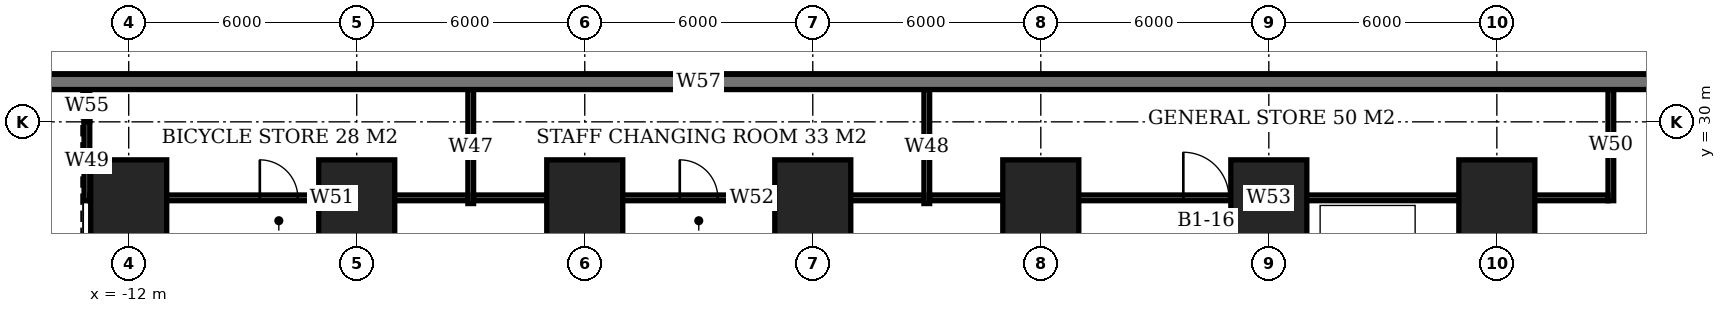
"""IFC4 building model, lengths in metres.
Left out: names, types, materials, properties, quantities, classifications, styles, units other than length and angle.
Written with IfcOpenShell. Run it as: python <this file> out.ifc"""

import sys

from ifc_helpers import new_model, si_unit, direction, frame, frame_2d, origin, origin_2d, place, context, subcontext, project, spatial, rectangle, extrude, element, fill, save


model = new_model("IFC4")
c1 = context("Model", 3, precision=1e-05, world=origin(), true_north=direction((0.0, 1.0)))
c2 = subcontext(c1, "Body", "Model", "MODEL_VIEW")
j1 = project(units=[si_unit("LENGTHUNIT", "METRE"), si_unit("PLANEANGLEUNIT", "RADIAN")], contexts=[c1])
p1 = place(None, origin())
s1 = spatial("IfcSite", under=j1, at=p1, CompositionType="ELEMENT")
p2 = place(p1, origin())
s2 = spatial("IfcBuilding", under=s1, at=p2, CompositionType="ELEMENT")
p3 = place(p2, frame((0.0, 0.0, -4.5)))
s3 = spatial("IfcBuildingStorey", under=s2, at=p3, CompositionType="ELEMENT", Elevation=-4.5)
for number, where, z_axis, x_axis in (
    (1, (-12.0, 28.0, 0.0), (0.0, 0.0, 1.0), (1.0, 0.0, 0.0)),
    (2, (-6.0, 28.0, 0.0), (0.0, 0.0, 1.0), (1.0, 0.0, 0.0)),
    (3, (0.0, 28.0, 0.0), (0.0, 0.0, 1.0), (1.0, 0.0, 0.0)),
    (4, (6.0, 28.0, 0.0), (0.0, 0.0, 1.0), (1.0, 0.0, 0.0)),
    (5, (12.0, 28.0, 0.0), (0.0, 0.0, 1.0), (1.0, 0.0, 0.0)),
    (6, (18.0, 28.0, 0.0), (0.0, 0.0, 1.0), (1.0, 0.0, 0.0)),
    (7, (24.0, 28.0, 0.0), (0.0, 0.0, 1.0), (1.0, 0.0, 0.0)),
):
    element("IfcColumn", number, at=place(p3, frame(where, z_axis=z_axis, x_axis=x_axis)), inside=s3, PredefinedType="COLUMN", context=c2, shape_type="SweptSolid", body=[
        extrude(rectangle(XDim=2.0, YDim=2.0, at=origin_2d()), origin(), (0.0, 0.0, 1.0), 4.05),
    ])
p4 = place(p3, frame((-24.35, 31.05, 0.0), z_axis=(0.0, 0.0, 1.0), x_axis=(1.0, 0.0, 0.0)))
e8 = element("IfcWall", 8, at=p4, inside=s3, PredefinedType="USERDEFINED", context=c2, shape_type="SweptSolid", body=[
    extrude(rectangle(XDim=54.7, YDim=0.4, at=frame_2d((27.35, 0.0))), origin(), (0.0, 0.0, 1.0), 4.5),
])
p5 = place(p3, frame((-13.025, 28.0, 0.0), z_axis=(0.0, 0.0, 1.0), x_axis=(1.0, 0.0, 0.0)))
e9 = element("IfcWall", 9, at=p5, inside=s3, PredefinedType="PARTITIONING", context=c2, shape_type="SweptSolid", body=[
    extrude(rectangle(XDim=9.95, YDim=0.15, at=frame_2d((4.975, 0.0))), origin(), (0.0, 0.0, 1.0), 4.05),
])
p6 = place(p5, frame((4.475, 0.0, 0.0)))
e10 = element("IfcOpeningElement", 10, at=p6, cuts=e9, PredefinedType="OPENING", context=c2, shape_type="SweptSolid", body=[
    extrude(rectangle(XDim=1.0, YDim=2.1, at=frame_2d((0.5, 1.05))), frame((0.0, 0.085, 0.0), z_axis=(0.0, -1.0, 0.0), x_axis=(1.0, 0.0, 0.0)), (0.0, 0.0, 1.0), 0.17),
])
p7 = place(p3, frame((-13.1, 27.925, 0.0), z_axis=(0.0, 0.0, 1.0), x_axis=(0.0, 1.0, 0.0)))
e11 = element("IfcWall", 11, at=p7, inside=s3, PredefinedType="PARTITIONING", context=c2, shape_type="SweptSolid", body=[
    extrude(rectangle(XDim=2.085, YDim=0.15, at=frame_2d((1.042, 0.0))), origin(), (0.0, 0.0, 1.0), 2.55),
])
p8 = place(p3, frame((-13.1, 30.01, 0.0), z_axis=(0.0, 0.0, 1.0), x_axis=(0.0, 1.0, 0.0)))
e12 = element("IfcWall", 12, at=p8, inside=s3, PredefinedType="PARTITIONING", context=c2, shape_type="SweptSolid", body=[
    extrude(rectangle(XDim=0.84, YDim=0.15, at=frame_2d((0.42, 0.0))), origin(), (0.0, 0.0, 1.0), 4.05),
])
p9 = place(p3, frame((-3.0, 27.85, 0.0), z_axis=(0.0, 0.0, 1.0), x_axis=(0.0, 1.0, 0.0)))
e13 = element("IfcWall", 13, at=p9, inside=s3, PredefinedType="PARTITIONING", context=c2, shape_type="SweptSolid", body=[
    extrude(rectangle(XDim=3.0, YDim=0.15, at=frame_2d((1.5, 0.0))), origin(), (0.0, 0.0, 1.0), 4.05),
])
p10 = place(p3, frame((-2.925, 28.0, 0.0), z_axis=(0.0, 0.0, 1.0), x_axis=(1.0, 0.0, 0.0)))
e14 = element("IfcWall", 14, at=p10, inside=s3, PredefinedType="PARTITIONING", context=c2, shape_type="SweptSolid", body=[
    extrude(rectangle(XDim=11.85, YDim=0.15, at=frame_2d((5.925, 0.0))), origin(), (0.0, 0.0, 1.0), 4.05),
])
p11 = place(p10, frame((5.425, 0.0, 0.0)))
e15 = element("IfcOpeningElement", 15, at=p11, cuts=e14, PredefinedType="OPENING", context=c2, shape_type="SweptSolid", body=[
    extrude(rectangle(XDim=1.0, YDim=2.1, at=frame_2d((0.5, 1.05))), frame((0.0, 0.085, 0.0), z_axis=(0.0, -1.0, 0.0), x_axis=(1.0, 0.0, 0.0)), (0.0, 0.0, 1.0), 0.17),
])
p12 = place(p3, frame((9.0, 27.85, 0.0), z_axis=(0.0, 0.0, 1.0), x_axis=(0.0, 1.0, 0.0)))
e16 = element("IfcWall", 16, at=p12, inside=s3, PredefinedType="PARTITIONING", context=c2, shape_type="SweptSolid", body=[
    extrude(rectangle(XDim=3.0, YDim=0.15, at=frame_2d((1.5, 0.0))), origin(), (0.0, 0.0, 1.0), 4.05),
])
p13 = place(p3, frame((9.075, 28.0, 0.0), z_axis=(0.0, 0.0, 1.0), x_axis=(1.0, 0.0, 0.0)))
e17 = element("IfcWall", 17, at=p13, inside=s3, PredefinedType="PARTITIONING", context=c2, shape_type="SweptSolid", body=[
    extrude(rectangle(XDim=17.85, YDim=0.15, at=frame_2d((8.925, 0.0))), origin(), (0.0, 0.0, 1.0), 4.05),
])
p14 = place(p13, frame((6.675, 0.0, 0.0)))
e18 = element("IfcOpeningElement", 18, at=p14, cuts=e17, PredefinedType="OPENING", context=c2, shape_type="SweptSolid", body=[
    extrude(rectangle(XDim=1.2, YDim=2.4, at=frame_2d((0.6, 1.2))), frame((0.0, 0.085, 0.0), z_axis=(0.0, -1.0, 0.0), x_axis=(1.0, 0.0, 0.0)), (0.0, 0.0, 1.0), 0.17),
])
p15 = place(p3, frame((27.0, 27.925, 0.0), z_axis=(0.0, 0.0, 1.0), x_axis=(0.0, 1.0, 0.0)))
e19 = element("IfcWall", 19, at=p15, inside=s3, PredefinedType="PARTITIONING", context=c2, shape_type="SweptSolid", body=[
    extrude(rectangle(XDim=2.925, YDim=0.15, at=frame_2d((1.462, 0.0))), origin(), (0.0, 0.0, 1.0), 4.05),
])
p16 = place(p6, origin())
e20 = element("IfcDoor", 20, at=p16, inside=s3, OperationType="SINGLE_SWING_LEFT", PredefinedType="DOOR", context=c2, shape_type="SweptSolid", body=[
    extrude(rectangle(XDim=1.0, YDim=2.1, at=frame_2d((0.5, 1.05))), frame((0.0, 0.025, 0.0), z_axis=(0.0, -1.0, 0.0), x_axis=(1.0, 0.0, 0.0)), (0.0, 0.0, 1.0), 0.05),
])
fill(e10, e20)
p17 = place(p11, origin())
e21 = element("IfcDoor", 21, at=p17, inside=s3, OperationType="SINGLE_SWING_LEFT", PredefinedType="DOOR", context=c2, shape_type="SweptSolid", body=[
    extrude(rectangle(XDim=1.0, YDim=2.1, at=frame_2d((0.5, 1.05))), frame((0.0, 0.025, 0.0), z_axis=(0.0, -1.0, 0.0), x_axis=(1.0, 0.0, 0.0)), (0.0, 0.0, 1.0), 0.05),
])
fill(e15, e21)
p18 = place(p14, origin())
e22 = element("IfcDoor", 22, at=p18, inside=s3, OperationType="SINGLE_SWING_LEFT", PredefinedType="DOOR", context=c2, shape_type="SweptSolid", body=[
    extrude(rectangle(XDim=1.2, YDim=2.4, at=frame_2d((0.6, 1.2))), frame((0.0, 0.025, 0.0), z_axis=(0.0, -1.0, 0.0), x_axis=(1.0, 0.0, 0.0)), (0.0, 0.0, 1.0), 0.05),
])
fill(e18, e22)
save(model, sys.argv[1])
